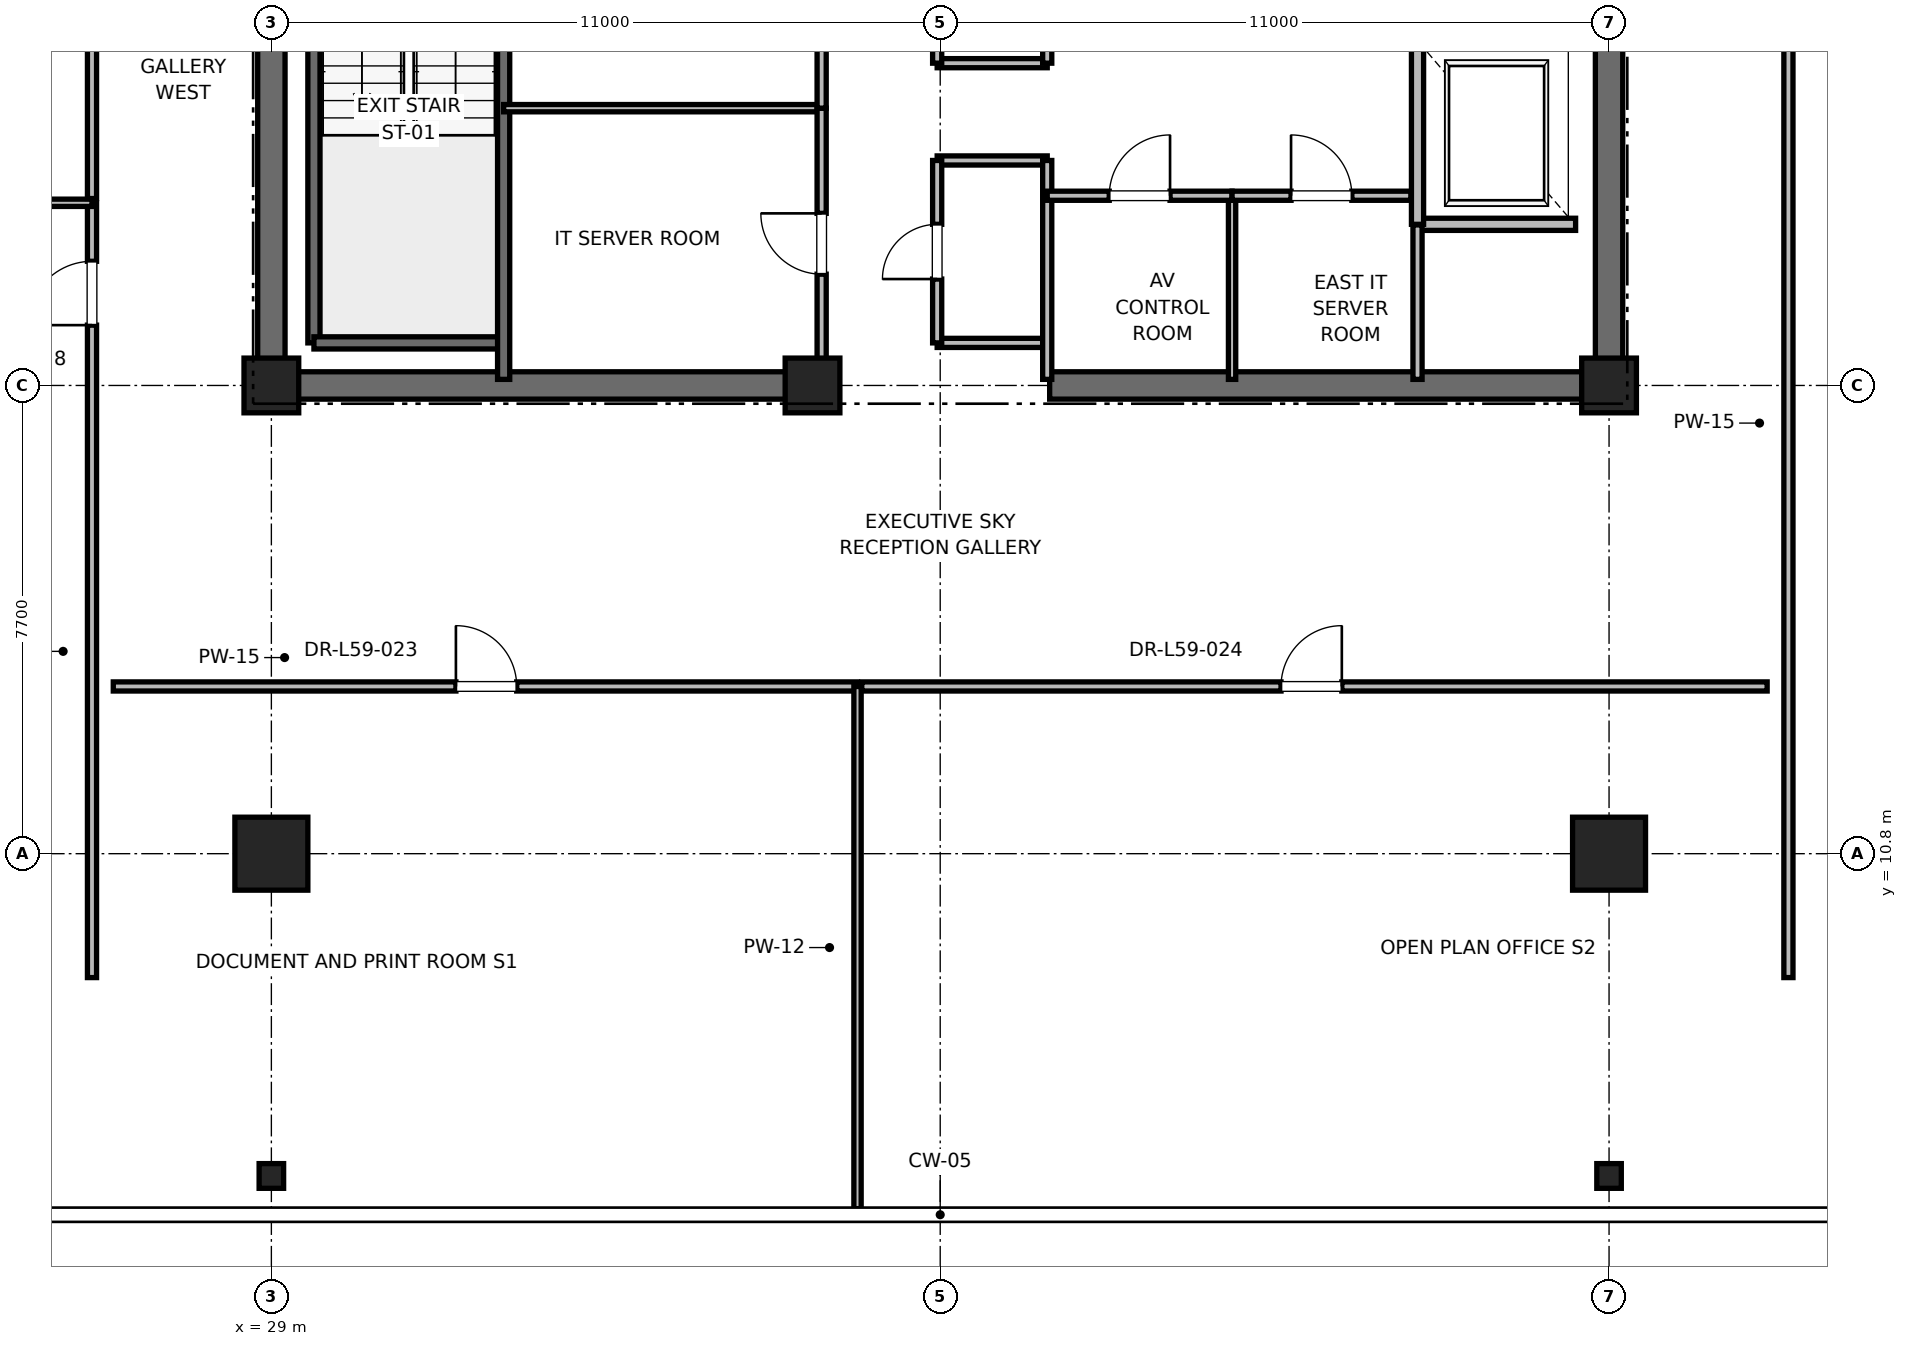
"""IFC4 building model, lengths in metres.
Left out: names, types, materials, properties, quantities, classifications, styles, units other than length and angle.
Written with IfcOpenShell. Run it as: python <this file> out.ifc"""

import sys

from ifc_helpers import new_model, si_unit, direction, frame, frame_2d, origin, origin_2d, place, context, subcontext, project, spatial, rectangle, i_section, extrude, element, fill, save


model = new_model("IFC4")
c1 = context("Model", 3, precision=1e-05, world=origin(), true_north=direction((0.0, 1.0)))
c2 = subcontext(c1, "Body", "Model", "MODEL_VIEW")
j1 = project(units=[si_unit("LENGTHUNIT", "METRE"), si_unit("PLANEANGLEUNIT", "RADIAN")], contexts=[c1])
p1 = place(None, origin())
s1 = spatial("IfcSite", under=j1, at=p1, CompositionType="ELEMENT")
p2 = place(p1, origin())
s2 = spatial("IfcBuilding", under=s1, at=p2, CompositionType="ELEMENT")
p3 = place(p2, frame((0.0, 0.0, 255.2)))
s3 = spatial("IfcBuildingStorey", under=s2, at=p3, CompositionType="ELEMENT", Elevation=255.2)
for number, where, z_axis, x_axis in (
    (1, (29.0, 10.8, 0.0), (0.0, 0.0, 1.0), (1.0, 0.0, 0.0)),
    (2, (51.0, 10.8, 0.0), (0.0, 0.0, 1.0), (1.0, 0.0, 0.0)),
):
    element("IfcColumn", number, at=place(p3, frame(where, z_axis=z_axis, x_axis=x_axis)), inside=s3, PredefinedType="COLUMN", context=c2, shape_type="SweptSolid", body=[
        extrude(rectangle(XDim=1.2, YDim=1.2, at=origin_2d()), origin(), (0.0, 0.0, 1.0), 4.0),
    ])
for number, where, z_axis, x_axis in (
    (3, (29.0, 5.5, 0.0), (0.0, 0.0, 1.0), (1.0, 0.0, 0.0)),
    (4, (51.0, 5.5, 0.0), (0.0, 0.0, 1.0), (1.0, 0.0, 0.0)),
):
    element("IfcColumn", number, at=place(p3, frame(where, z_axis=z_axis, x_axis=x_axis)), inside=s3, PredefinedType="COLUMN", context=c2, shape_type="SweptSolid", body=[
        extrude(i_section(OverallWidth=0.403, OverallDepth=0.406, WebThickness=0.027, FlangeThickness=0.043, FilletRadius=0.015, at=origin_2d()), origin(), (0.0, 0.0, 1.0), 4.0),
    ])
for number, where, z_axis, x_axis in (
    (5, (29.0, 18.5, 0.0), (0.0, 0.0, 1.0), (1.0, 0.0, 0.0)),
    (6, (51.0, 18.5, 0.0), (0.0, 0.0, 1.0), (1.0, 0.0, 0.0)),
    (7, (37.9, 18.5, 0.0), (0.0, 0.0, 1.0), (1.0, 0.0, 0.0)),
):
    element("IfcColumn", number, at=place(p3, frame(where, z_axis=z_axis, x_axis=x_axis)), inside=s3, PredefinedType="PILASTER", context=c2, shape_type="SweptSolid", body=[
        extrude(rectangle(XDim=0.9, YDim=0.9, at=origin_2d()), origin(), (0.0, 0.0, 1.0), 4.0),
    ])
for number, where, z_axis, x_axis in (
    (8, (29.0, 18.5, 0.0), (0.0, 0.0, 1.0), (1.0, 0.0, 0.0)),
    (9, (41.8, 18.5, 0.0), (0.0, 0.0, 1.0), (1.0, 0.0, 0.0)),
):
    element("IfcWall", number, at=place(p3, frame(where, z_axis=z_axis, x_axis=x_axis)), inside=s3, PredefinedType="SHEAR", context=c2, shape_type="SweptSolid", body=[
        extrude(rectangle(XDim=9.2, YDim=0.45, at=frame_2d((4.6, 0.0))), origin(), (0.0, 0.0, 1.0), 3.785),
    ])
p4 = place(p3, frame((29.0, 18.5, 0.0), z_axis=(0.0, 0.0, 1.0), x_axis=(0.0, 1.0, 0.0)))
e10 = element("IfcWall", 10, at=p4, inside=s3, PredefinedType="SHEAR", context=c2, shape_type="SweptSolid", body=[
    extrude(rectangle(XDim=8.8, YDim=0.45, at=frame_2d((4.4, 0.0))), origin(), (0.0, 0.0, 1.0), 3.785),
])
p5 = place(p3, frame((51.0, 18.5, 0.0), z_axis=(0.0, 0.0, 1.0), x_axis=(0.0, 1.0, 0.0)))
e11 = element("IfcWall", 11, at=p5, inside=s3, PredefinedType="SHEAR", context=c2, shape_type="SweptSolid", body=[
    extrude(rectangle(XDim=5.8, YDim=0.45, at=frame_2d((2.9, 0.0))), origin(), (0.0, 0.0, 1.0), 3.785),
])
p6 = place(p3, frame((29.7, 19.2, 0.0), z_axis=(0.0, 0.0, 1.0), x_axis=(0.0, 1.0, 0.0)))
e12 = element("IfcWall", 12, at=p6, inside=s3, PredefinedType="SOLIDWALL", context=c2, shape_type="SweptSolid", body=[
    extrude(rectangle(XDim=8.15, YDim=0.2, at=frame_2d((4.075, 0.0))), origin(), (0.0, 0.0, 1.0), 3.785),
])
p7 = place(p3, frame((29.7, 19.2, 0.0), z_axis=(0.0, 0.0, 1.0), x_axis=(1.0, 0.0, 0.0)))
e13 = element("IfcWall", 13, at=p7, inside=s3, PredefinedType="SOLIDWALL", context=c2, shape_type="SweptSolid", body=[
    extrude(rectangle(XDim=3.12, YDim=0.2, at=frame_2d((1.56, 0.0))), origin(), (0.0, 0.0, 1.0), 3.785),
])
p8 = place(p3, frame((32.82, 18.6, 0.0), z_axis=(0.0, 0.0, 1.0), x_axis=(0.0, 1.0, 0.0)))
e14 = element("IfcWall", 14, at=p8, inside=s3, PredefinedType="SOLIDWALL", context=c2, shape_type="SweptSolid", body=[
    extrude(rectangle(XDim=8.78, YDim=0.2, at=frame_2d((4.39, 0.0))), origin(), (0.0, 0.0, 1.0), 3.785),
])
p9 = place(p3, frame((47.85, 21.15, 0.0), z_axis=(0.0, 0.0, 1.0), x_axis=(1.0, 0.0, 0.0)))
e15 = element("IfcWall", 15, at=p9, inside=s3, PredefinedType="SOLIDWALL", context=c2, shape_type="SweptSolid", body=[
    extrude(rectangle(XDim=2.6, YDim=0.2, at=frame_2d((1.3, 0.0))), origin(), (0.0, 0.0, 1.0), 3.785),
])
p10 = place(p3, frame((47.85, 24.15, 0.0), z_axis=(0.0, 0.0, 1.0), x_axis=(0.0, -1.0, 0.0)))
e16 = element("IfcWall", 16, at=p10, inside=s3, PredefinedType="SOLIDWALL", context=c2, shape_type="SweptSolid", body=[
    extrude(rectangle(XDim=3.0, YDim=0.2, at=frame_2d((1.5, 0.0))), origin(), (0.0, 0.0, 1.0), 3.785),
])
for number, where, z_axis, x_axis in (
    (17, (39.95, 19.2, 0.0), (0.0, 0.0, 1.0), (1.0, 0.0, 0.0)),
    (18, (39.95, 22.2, 0.0), (0.0, 0.0, 1.0), (1.0, 0.0, 0.0)),
    (19, (39.95, 23.8, 0.0), (0.0, 0.0, 1.0), (1.0, 0.0, 0.0)),
):
    element("IfcWall", number, at=place(p3, frame(where, z_axis=z_axis, x_axis=x_axis)), inside=s3, PredefinedType="PARTITIONING", context=c2, shape_type="SweptSolid", body=[
        extrude(rectangle(XDim=1.81, YDim=0.15, at=frame_2d((0.905, 0.0))), origin(), (0.0, 0.0, 1.0), 2.85),
    ])
p11 = place(p3, frame((41.76, 18.6, 0.0), z_axis=(0.0, 0.0, 1.0), x_axis=(0.0, 1.0, 0.0)))
e20 = element("IfcWall", 20, at=p11, inside=s3, PredefinedType="PARTITIONING", context=c2, shape_type="SweptSolid", body=[
    extrude(rectangle(XDim=3.6, YDim=0.15, at=frame_2d((1.8, 0.0))), origin(), (0.0, 0.0, 1.0), 2.85),
])
p12 = place(p3, frame((41.76, 23.8, 0.0), z_axis=(0.0, 0.0, 1.0), x_axis=(0.0, 1.0, 0.0)))
e21 = element("IfcWall", 21, at=p12, inside=s3, PredefinedType="PARTITIONING", context=c2, shape_type="SweptSolid", body=[
    extrude(rectangle(XDim=4.0, YDim=0.15, at=frame_2d((2.0, 0.0))), origin(), (0.0, 0.0, 1.0), 2.85),
])
p13 = place(p3, frame((39.95, 19.2, 0.0), z_axis=(0.0, 0.0, 1.0), x_axis=(0.0, 1.0, 0.0)))
e22 = element("IfcWall", 22, at=p13, inside=s3, PredefinedType="PARTITIONING", context=c2, shape_type="SweptSolid", body=[
    extrude(rectangle(XDim=3.0, YDim=0.15, at=frame_2d((1.5, 0.0))), origin(), (0.0, 0.0, 1.0), 2.85),
])
p14 = place(p13, frame((1.05, 0.0, 0.0)))
e23 = element("IfcOpeningElement", 23, at=p14, cuts=e22, PredefinedType="OPENING", context=c2, shape_type="SweptSolid", body=[
    extrude(rectangle(XDim=0.9, YDim=2.1, at=frame_2d((0.45, 1.05))), frame((0.0, 0.075, 0.0), z_axis=(0.0, -1.0, 0.0), x_axis=(1.0, 0.0, 0.0)), (0.0, 0.0, 1.0), 0.15),
])
p15 = place(p3, frame((39.95, 23.8, 0.0), z_axis=(0.0, 0.0, 1.0), x_axis=(0.0, 1.0, 0.0)))
e24 = element("IfcWall", 24, at=p15, inside=s3, PredefinedType="PARTITIONING", context=c2, shape_type="SweptSolid", body=[
    extrude(rectangle(XDim=2.0, YDim=0.15, at=frame_2d((1.0, 0.0))), origin(), (0.0, 0.0, 1.0), 2.85),
])
p16 = place(p15, frame((0.55, 0.0, 0.0)))
e25 = element("IfcOpeningElement", 25, at=p16, cuts=e24, PredefinedType="OPENING", context=c2, shape_type="SweptSolid", body=[
    extrude(rectangle(XDim=0.9, YDim=2.1, at=frame_2d((0.45, 1.05))), frame((0.0, 0.075, 0.0), z_axis=(0.0, -1.0, 0.0), x_axis=(1.0, 0.0, 0.0)), (0.0, 0.0, 1.0), 0.15),
])
p17 = place(p3, frame((32.82, 23.06, 0.0), z_axis=(0.0, 0.0, 1.0), x_axis=(1.0, 0.0, 0.0)))
e26 = element("IfcWall", 26, at=p17, inside=s3, PredefinedType="PARTITIONING", context=c2, shape_type="SweptSolid", body=[
    extrude(rectangle(XDim=5.23, YDim=0.12, at=frame_2d((2.615, 0.0))), origin(), (0.0, 0.0, 1.0), 2.85),
])
p18 = place(p3, frame((38.05, 18.6, 0.0), z_axis=(0.0, 0.0, 1.0), x_axis=(0.0, 1.0, 0.0)))
e27 = element("IfcWall", 27, at=p18, inside=s3, PredefinedType="PARTITIONING", context=c2, shape_type="SweptSolid", body=[
    extrude(rectangle(XDim=4.46, YDim=0.15, at=frame_2d((2.23, 0.0))), origin(), (0.0, 0.0, 1.0), 2.85),
])
p19 = place(p18, frame((1.73, 0.0, 0.0)))
e28 = element("IfcOpeningElement", 28, at=p19, cuts=e27, PredefinedType="OPENING", context=c2, shape_type="SweptSolid", body=[
    extrude(rectangle(XDim=1.0, YDim=2.15, at=frame_2d((0.5, 1.075))), frame((0.0, 0.075, 0.0), z_axis=(0.0, -1.0, 0.0), x_axis=(1.0, 0.0, 0.0)), (0.0, 0.0, 1.0), 0.15),
])
p20 = place(p3, frame((38.05, 23.06, 0.0), z_axis=(0.0, 0.0, 1.0), x_axis=(0.0, 1.0, 0.0)))
e29 = element("IfcWall", 29, at=p20, inside=s3, PredefinedType="PARTITIONING", context=c2, shape_type="SweptSolid", body=[
    extrude(rectangle(XDim=4.32, YDim=0.15, at=frame_2d((2.16, 0.0))), origin(), (0.0, 0.0, 1.0), 2.85),
])
p21 = place(p20, frame((1.66, 0.0, 0.0)))
e30 = element("IfcOpeningElement", 30, at=p21, cuts=e29, PredefinedType="OPENING", context=c2, shape_type="SweptSolid", body=[
    extrude(rectangle(XDim=1.0, YDim=2.15, at=frame_2d((0.5, 1.075))), frame((0.0, 0.075, 0.0), z_axis=(0.0, -1.0, 0.0), x_axis=(1.0, 0.0, 0.0)), (0.0, 0.0, 1.0), 0.15),
])
p22 = place(p3, frame((47.85, 18.6, 0.0), z_axis=(0.0, 0.0, 1.0), x_axis=(0.0, 1.0, 0.0)))
e31 = element("IfcWall", 31, at=p22, inside=s3, PredefinedType="PARTITIONING", context=c2, shape_type="SweptSolid", body=[
    extrude(rectangle(XDim=2.54, YDim=0.15, at=frame_2d((1.27, 0.0))), origin(), (0.0, 0.0, 1.0), 2.85),
])
p23 = place(p3, frame((44.8, 18.6, 0.0), z_axis=(0.0, 0.0, 1.0), x_axis=(0.0, 1.0, 0.0)))
e32 = element("IfcWall", 32, at=p23, inside=s3, PredefinedType="PARTITIONING", context=c2, shape_type="SweptSolid", body=[
    extrude(rectangle(XDim=3.02, YDim=0.12, at=frame_2d((1.51, 0.0))), origin(), (0.0, 0.0, 1.0), 2.85),
])
p24 = place(p3, frame((41.76, 21.62, 0.0), z_axis=(0.0, 0.0, 1.0), x_axis=(1.0, 0.0, 0.0)))
e33 = element("IfcWall", 33, at=p24, inside=s3, PredefinedType="PARTITIONING", context=c2, shape_type="SweptSolid", body=[
    extrude(rectangle(XDim=3.04, YDim=0.15, at=frame_2d((1.52, 0.0))), origin(), (0.0, 0.0, 1.0), 2.85),
])
p25 = place(p24, frame((1.02, 0.0, 0.0)))
e34 = element("IfcOpeningElement", 34, at=p25, cuts=e33, PredefinedType="OPENING", context=c2, shape_type="SweptSolid", body=[
    extrude(rectangle(XDim=1.0, YDim=2.15, at=frame_2d((0.5, 1.075))), frame((0.0, 0.075, 0.0), z_axis=(0.0, -1.0, 0.0), x_axis=(1.0, 0.0, 0.0)), (0.0, 0.0, 1.0), 0.15),
])
p26 = place(p3, frame((44.8, 21.62, 0.0), z_axis=(0.0, 0.0, 1.0), x_axis=(1.0, 0.0, 0.0)))
e35 = element("IfcWall", 35, at=p26, inside=s3, PredefinedType="PARTITIONING", context=c2, shape_type="SweptSolid", body=[
    extrude(rectangle(XDim=2.94, YDim=0.15, at=frame_2d((1.47, 0.0))), origin(), (0.0, 0.0, 1.0), 2.85),
])
p27 = place(p26, frame((0.97, 0.0, 0.0)))
e36 = element("IfcOpeningElement", 36, at=p27, cuts=e35, PredefinedType="OPENING", context=c2, shape_type="SweptSolid", body=[
    extrude(rectangle(XDim=1.0, YDim=2.15, at=frame_2d((0.5, 1.075))), frame((0.0, 0.075, 0.0), z_axis=(0.0, -1.0, 0.0), x_axis=(1.0, 0.0, 0.0)), (0.0, 0.0, 1.0), 0.15),
])
p28 = place(p3, frame((26.4, 13.55, 0.0), z_axis=(0.0, 0.0, 1.0), x_axis=(1.0, 0.0, 0.0)))
e37 = element("IfcWall", 37, at=p28, inside=s3, PredefinedType="PARTITIONING", context=c2, shape_type="SweptSolid", body=[
    extrude(rectangle(XDim=12.24, YDim=0.15, at=frame_2d((6.12, 0.0))), origin(), (0.0, 0.0, 1.0), 2.85),
])
p29 = place(p28, frame((5.635, 0.0, 0.0)))
e38 = element("IfcOpeningElement", 38, at=p29, cuts=e37, PredefinedType="OPENING", context=c2, shape_type="SweptSolid", body=[
    extrude(rectangle(XDim=1.0, YDim=2.15, at=frame_2d((0.5, 1.075))), frame((0.0, 0.075, 0.0), z_axis=(0.0, -1.0, 0.0), x_axis=(1.0, 0.0, 0.0)), (0.0, 0.0, 1.0), 0.15),
])
p30 = place(p3, frame((38.64, 4.962, 0.0), z_axis=(0.0, 0.0, 1.0), x_axis=(0.0, 1.0, 0.0)))
e39 = element("IfcWall", 39, at=p30, inside=s3, PredefinedType="PARTITIONING", context=c2, shape_type="SweptSolid", body=[
    extrude(rectangle(XDim=8.588, YDim=0.12, at=frame_2d((4.294, 0.0))), origin(), (0.0, 0.0, 1.0), 2.415),
])
p31 = place(p3, frame((38.71, 13.55, 0.0), z_axis=(0.0, 0.0, 1.0), x_axis=(1.0, 0.0, 0.0)))
e40 = element("IfcWall", 40, at=p31, inside=s3, PredefinedType="PARTITIONING", context=c2, shape_type="SweptSolid", body=[
    extrude(rectangle(XDim=14.89, YDim=0.15, at=frame_2d((7.445, 0.0))), origin(), (0.0, 0.0, 1.0), 2.85),
])
p32 = place(p31, frame((6.895, 0.0, 0.0)))
e41 = element("IfcOpeningElement", 41, at=p32, cuts=e40, PredefinedType="OPENING", context=c2, shape_type="SweptSolid", body=[
    extrude(rectangle(XDim=1.0, YDim=2.15, at=frame_2d((0.5, 1.075))), frame((0.0, 0.075, 0.0), z_axis=(0.0, -1.0, 0.0), x_axis=(1.0, 0.0, 0.0)), (0.0, 0.0, 1.0), 0.15),
])
p33 = place(p3, frame((26.05, 8.762, 0.0), z_axis=(0.0, 0.0, 1.0), x_axis=(0.0, 1.0, 0.0)))
e42 = element("IfcWall", 42, at=p33, inside=s3, PredefinedType="PARTITIONING", context=c2, shape_type="SweptSolid", body=[
    extrude(rectangle(XDim=12.741, YDim=0.15, at=frame_2d((6.371, 0.0))), origin(), (0.0, 0.0, 1.0), 2.85),
])
p34 = place(p33, frame((10.729, 0.0, 0.0)))
e43 = element("IfcOpeningElement", 43, at=p34, cuts=e42, PredefinedType="OPENING", context=c2, shape_type="SweptSolid", body=[
    extrude(rectangle(XDim=1.05, YDim=2.2, at=frame_2d((0.525, 1.1))), frame((0.0, 0.075, 0.0), z_axis=(0.0, -1.0, 0.0), x_axis=(1.0, 0.0, 0.0)), (0.0, 0.0, 1.0), 0.15),
])
p35 = place(p3, frame((13.704, 21.504, 0.0), z_axis=(0.0, 0.0, 1.0), x_axis=(1.0, 0.0, 0.0)))
e44 = element("IfcWall", 44, at=p35, inside=s3, PredefinedType="PARTITIONING", context=c2, shape_type="SweptSolid", body=[
    extrude(rectangle(XDim=12.346, YDim=0.12, at=frame_2d((6.173, 0.0))), origin(), (0.0, 0.0, 1.0), 2.85),
])
p36 = place(p3, frame((26.05, 21.574, 0.0), z_axis=(0.0, 0.0, 1.0), x_axis=(0.0, 1.0, 0.0)))
e45 = element("IfcWall", 45, at=p36, inside=s3, PredefinedType="PARTITIONING", context=c2, shape_type="SweptSolid", body=[
    extrude(rectangle(XDim=12.672, YDim=0.15, at=frame_2d((6.336, 0.0))), origin(), (0.0, 0.0, 1.0), 2.85),
])
p37 = place(p36, frame((5.551, 0.0, 0.0)))
e46 = element("IfcOpeningElement", 46, at=p37, cuts=e45, PredefinedType="OPENING", context=c2, shape_type="SweptSolid", body=[
    extrude(rectangle(XDim=1.5, YDim=2.25, at=frame_2d((0.75, 1.125))), frame((0.0, 0.075, 0.0), z_axis=(0.0, -1.0, 0.0), x_axis=(1.0, 0.0, 0.0)), (0.0, 0.0, 1.0), 0.15),
])
p38 = place(p3, frame((53.95, 8.762, 0.0), z_axis=(0.0, 0.0, 1.0), x_axis=(0.0, 1.0, 0.0)))
e47 = element("IfcWall", 47, at=p38, inside=s3, PredefinedType="PARTITIONING", context=c2, shape_type="SweptSolid", body=[
    extrude(rectangle(XDim=37.475, YDim=0.15, at=frame_2d((18.738, 0.0))), origin(), (0.0, 0.0, 1.0), 2.85),
])
p39 = place(p38, frame((18.238, 0.0, 0.0)))
e48 = element("IfcOpeningElement", 48, at=p39, cuts=e47, PredefinedType="OPENING", context=c2, shape_type="SweptSolid", body=[
    extrude(rectangle(XDim=1.0, YDim=2.15, at=frame_2d((0.5, 1.075))), frame((0.0, 0.075, 0.0), z_axis=(0.0, -1.0, 0.0), x_axis=(1.0, 0.0, 0.0)), (0.0, 0.0, 1.0), 0.15),
])
p40 = place(p14, origin())
e49 = element("IfcDoor", 49, at=p40, inside=s3, OperationType="SINGLE_SWING_LEFT", PredefinedType="DOOR", context=c2, shape_type="SweptSolid", body=[
    extrude(rectangle(XDim=0.9, YDim=2.1, at=frame_2d((0.45, 1.05))), frame((0.0, 0.025, 0.0), z_axis=(0.0, -1.0, 0.0), x_axis=(1.0, 0.0, 0.0)), (0.0, 0.0, 1.0), 0.05),
])
fill(e23, e49)
p41 = place(p19, origin())
e50 = element("IfcDoor", 50, at=p41, inside=s3, OperationType="SINGLE_SWING_RIGHT", PredefinedType="DOOR", context=c2, shape_type="SweptSolid", body=[
    extrude(rectangle(XDim=1.0, YDim=2.15, at=frame_2d((0.5, 1.075))), frame((0.0, 0.025, 0.0), z_axis=(0.0, -1.0, 0.0), x_axis=(1.0, 0.0, 0.0)), (0.0, 0.0, 1.0), 0.05),
])
fill(e28, e50)
p42 = place(p25, origin())
e51 = element("IfcDoor", 51, at=p42, inside=s3, OperationType="SINGLE_SWING_RIGHT", PredefinedType="DOOR", context=c2, shape_type="SweptSolid", body=[
    extrude(rectangle(XDim=1.0, YDim=2.15, at=frame_2d((0.5, 1.075))), frame((0.0, 0.025, 0.0), z_axis=(0.0, -1.0, 0.0), x_axis=(1.0, 0.0, 0.0)), (0.0, 0.0, 1.0), 0.05),
])
fill(e34, e51)
p43 = place(p27, origin())
e52 = element("IfcDoor", 52, at=p43, inside=s3, OperationType="SINGLE_SWING_LEFT", PredefinedType="DOOR", context=c2, shape_type="SweptSolid", body=[
    extrude(rectangle(XDim=1.0, YDim=2.15, at=frame_2d((0.5, 1.075))), frame((0.0, 0.025, 0.0), z_axis=(0.0, -1.0, 0.0), x_axis=(1.0, 0.0, 0.0)), (0.0, 0.0, 1.0), 0.05),
])
fill(e36, e52)
p44 = place(p29, origin())
e53 = element("IfcDoor", 53, at=p44, inside=s3, OperationType="SINGLE_SWING_LEFT", PredefinedType="DOOR", context=c2, shape_type="SweptSolid", body=[
    extrude(rectangle(XDim=1.0, YDim=2.15, at=frame_2d((0.5, 1.075))), frame((0.0, 0.025, 0.0), z_axis=(0.0, -1.0, 0.0), x_axis=(1.0, 0.0, 0.0)), (0.0, 0.0, 1.0), 0.05),
])
fill(e38, e53)
p45 = place(p32, origin())
e54 = element("IfcDoor", 54, at=p45, inside=s3, OperationType="SINGLE_SWING_RIGHT", PredefinedType="DOOR", context=c2, shape_type="SweptSolid", body=[
    extrude(rectangle(XDim=1.0, YDim=2.15, at=frame_2d((0.5, 1.075))), frame((0.0, 0.025, 0.0), z_axis=(0.0, -1.0, 0.0), x_axis=(1.0, 0.0, 0.0)), (0.0, 0.0, 1.0), 0.05),
])
fill(e41, e54)
p46 = place(p34, origin())
e55 = element("IfcDoor", 55, at=p46, inside=s3, OperationType="SINGLE_SWING_LEFT", PredefinedType="DOOR", context=c2, shape_type="SweptSolid", body=[
    extrude(rectangle(XDim=1.05, YDim=2.2, at=frame_2d((0.525, 1.1))), frame((0.0, 0.025, 0.0), z_axis=(0.0, -1.0, 0.0), x_axis=(1.0, 0.0, 0.0)), (0.0, 0.0, 1.0), 0.05),
])
fill(e43, e55)
save(model, sys.argv[1])
